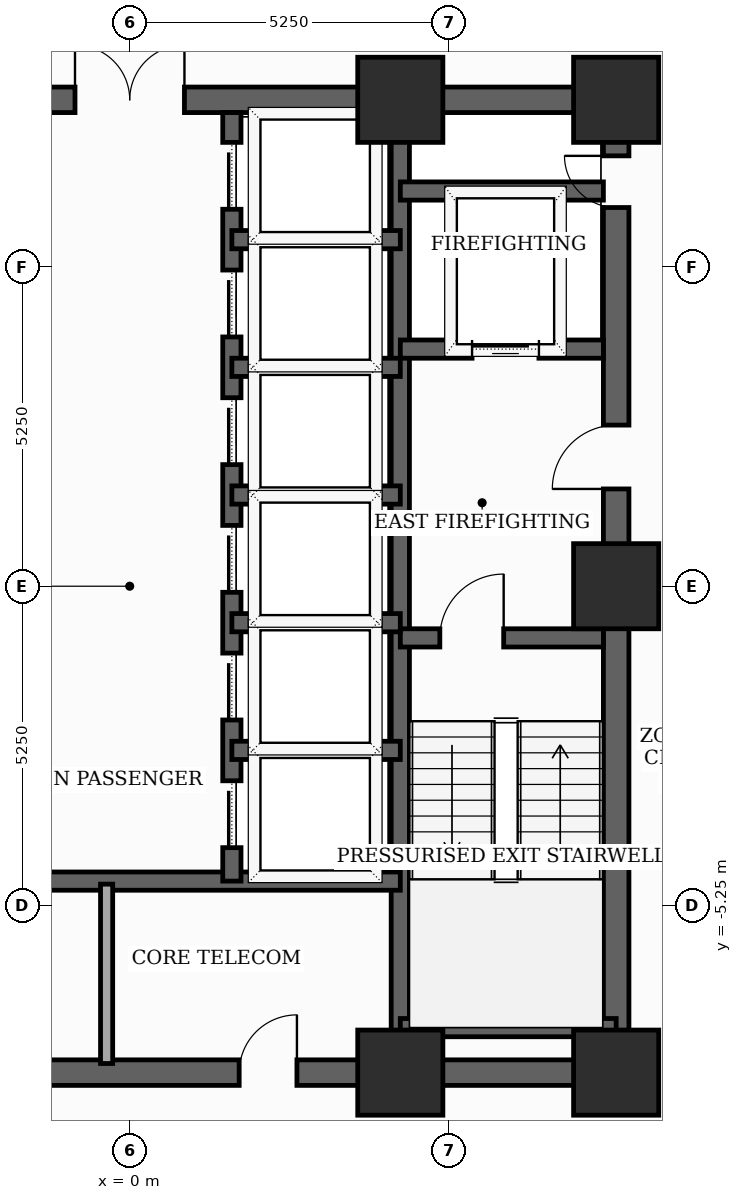
"""IFC4 building model, lengths in metres.
Left out: names, types, materials, properties, quantities, classifications, styles, units other than length and angle.
Written with IfcOpenShell. Run it as: python <this file> out.ifc"""

import sys

from ifc_helpers import new_model, si_unit, direction, frame, frame_2d, origin, origin_2d, place, context, subcontext, project, spatial, rectangle, extrude, element, fill, save


model = new_model("IFC4")
c1 = context("Model", 3, precision=1e-05, world=origin(), true_north=direction((0.0, 1.0)))
c2 = subcontext(c1, "Body", "Model", "MODEL_VIEW")
j1 = project(units=[si_unit("LENGTHUNIT", "METRE"), si_unit("PLANEANGLEUNIT", "RADIAN")], contexts=[c1])
p1 = place(None, origin())
s1 = spatial("IfcSite", under=j1, at=p1, CompositionType="ELEMENT")
p2 = place(p1, origin())
s2 = spatial("IfcBuilding", under=s1, at=p2, CompositionType="ELEMENT")
p3 = place(p2, frame((0.0, 0.0, 97.7)))
s3 = spatial("IfcBuildingStorey", under=s2, at=p3, CompositionType="ELEMENT", Elevation=97.7)
for number, where, z_axis, x_axis in (
    (1, (4.45, -8.0, 0.0), (0.0, 0.0, 1.0), (1.0, 0.0, 0.0)),
    (2, (8.0, -8.0, 0.0), (0.0, 0.0, 1.0), (1.0, 0.0, 0.0)),
    (3, (8.0, 0.0, 0.0), (0.0, 0.0, 1.0), (1.0, 0.0, 0.0)),
    (4, (8.0, 8.0, 0.0), (0.0, 0.0, 1.0), (1.0, 0.0, 0.0)),
    (5, (4.45, 8.0, 0.0), (0.0, 0.0, 1.0), (1.0, 0.0, 0.0)),
):
    element("IfcColumn", number, at=place(p3, frame(where, z_axis=z_axis, x_axis=x_axis)), inside=s3, PredefinedType="COLUMN", context=c2, shape_type="SweptSolid", body=[
        extrude(rectangle(XDim=1.4, YDim=1.4, at=origin_2d()), origin(), (0.0, 0.0, 1.0), 3.7),
    ])
p4 = place(p3, frame((8.0, -8.0, 0.0), z_axis=(0.0, 0.0, 1.0), x_axis=(0.0, 1.0, 0.0)))
e6 = element("IfcWall", 6, at=p4, inside=s3, PredefinedType="SHEAR", context=c2, shape_type="SweptSolid", body=[
    extrude(rectangle(XDim=16.0, YDim=0.42, at=frame_2d((8.0, 0.0))), origin(), (0.0, 0.0, 1.0), 3.5),
])
p5 = place(p4, frame((9.6, 0.0, 0.0)))
e7 = element("IfcOpeningElement", 7, at=p5, cuts=e6, PredefinedType="OPENING", context=c2, shape_type="SweptSolid", body=[
    extrude(rectangle(XDim=1.05, YDim=2.15, at=frame_2d((0.525, 1.075))), frame((0.0, 0.22, 0.0), z_axis=(0.0, -1.0, 0.0), x_axis=(1.0, 0.0, 0.0)), (0.0, 0.0, 1.0), 0.44),
])
p6 = place(p4, frame((14.229, 0.0, 0.0)))
e8 = element("IfcOpeningElement", 8, at=p6, cuts=e6, PredefinedType="OPENING", context=c2, shape_type="SweptSolid", body=[
    extrude(rectangle(XDim=0.85, YDim=2.02, at=frame_2d((0.425, 1.01))), frame((0.0, 0.22, 0.0), z_axis=(0.0, -1.0, 0.0), x_axis=(1.0, 0.0, 0.0)), (0.0, 0.0, 1.0), 0.44),
])
p7 = place(p3, frame((-8.0, -8.0, 0.0), z_axis=(0.0, 0.0, 1.0), x_axis=(1.0, 0.0, 0.0)))
e9 = element("IfcWall", 9, at=p7, inside=s3, PredefinedType="SHEAR", context=c2, shape_type="SweptSolid", body=[
    extrude(rectangle(XDim=16.0, YDim=0.42, at=frame_2d((8.0, 0.0))), origin(), (0.0, 0.0, 1.0), 3.5),
])
p8 = place(p7, frame((5.2, 0.0, 0.0)))
e10 = element("IfcOpeningElement", 10, at=p8, cuts=e9, PredefinedType="OPENING", context=c2, shape_type="SweptSolid", body=[
    extrude(rectangle(XDim=0.95, YDim=2.1, at=frame_2d((0.475, 1.05))), frame((0.0, 0.22, 0.0), z_axis=(0.0, -1.0, 0.0), x_axis=(1.0, 0.0, 0.0)), (0.0, 0.0, 1.0), 0.44),
])
p9 = place(p7, frame((9.8, 0.0, 0.0)))
e11 = element("IfcOpeningElement", 11, at=p9, cuts=e9, PredefinedType="OPENING", context=c2, shape_type="SweptSolid", body=[
    extrude(rectangle(XDim=0.95, YDim=2.1, at=frame_2d((0.475, 1.05))), frame((0.0, 0.22, 0.0), z_axis=(0.0, -1.0, 0.0), x_axis=(1.0, 0.0, 0.0)), (0.0, 0.0, 1.0), 0.44),
])
p10 = place(p3, frame((-8.0, 8.0, 0.0), z_axis=(0.0, 0.0, 1.0), x_axis=(1.0, 0.0, 0.0)))
e12 = element("IfcWall", 12, at=p10, inside=s3, PredefinedType="SHEAR", context=c2, shape_type="SweptSolid", body=[
    extrude(rectangle(XDim=16.0, YDim=0.42, at=frame_2d((8.0, 0.0))), origin(), (0.0, 0.0, 1.0), 3.5),
])
p11 = place(p10, frame((7.1, 0.0, 0.0)))
e13 = element("IfcOpeningElement", 13, at=p11, cuts=e12, PredefinedType="OPENING", context=c2, shape_type="SweptSolid", body=[
    extrude(rectangle(XDim=1.8, YDim=2.15, at=frame_2d((0.9, 1.075))), frame((0.0, 0.22, 0.0), z_axis=(0.0, -1.0, 0.0), x_axis=(1.0, 0.0, 0.0)), (0.0, 0.0, 1.0), 0.44),
])
p12 = place(p3, frame((4.45, -7.79, 0.0), z_axis=(0.0, 0.0, 1.0), x_axis=(0.0, 1.0, 0.0)))
e14 = element("IfcWall", 14, at=p12, inside=s3, PredefinedType="SHEAR", context=c2, shape_type="SweptSolid", body=[
    extrude(rectangle(XDim=15.58, YDim=0.3, at=frame_2d((7.79, 0.0))), origin(), (0.0, 0.0, 1.0), 3.5),
])
p13 = place(p3, frame((4.45, -0.85, 0.0), z_axis=(0.0, 0.0, 1.0), x_axis=(1.0, 0.0, 0.0)))
e15 = element("IfcWall", 15, at=p13, inside=s3, PredefinedType="SHEAR", context=c2, shape_type="SweptSolid", body=[
    extrude(rectangle(XDim=3.34, YDim=0.3, at=frame_2d((1.67, 0.0))), origin(), (0.0, 0.0, 1.0), 3.5),
])
p14 = place(p13, frame((0.65, 0.0, 0.0)))
e16 = element("IfcOpeningElement", 16, at=p14, cuts=e15, PredefinedType="OPENING", context=c2, shape_type="SweptSolid", body=[
    extrude(rectangle(XDim=1.05, YDim=2.15, at=frame_2d((0.525, 1.075))), frame((0.0, 0.16, 0.0), z_axis=(0.0, -1.0, 0.0), x_axis=(1.0, 0.0, 0.0)), (0.0, 0.0, 1.0), 0.32),
])
p15 = place(p3, frame((4.45, -7.26, 0.0), z_axis=(0.0, 0.0, 1.0), x_axis=(1.0, 0.0, 0.0)))
e17 = element("IfcWall", 17, at=p15, inside=s3, PredefinedType="SHEAR", context=c2, shape_type="SweptSolid", body=[
    extrude(rectangle(XDim=3.55, YDim=0.3, at=frame_2d((1.775, 0.0))), origin(), (0.0, 0.0, 1.0), 3.5),
])
p16 = place(p3, frame((4.45, 3.9, 0.0), z_axis=(0.0, 0.0, 1.0), x_axis=(1.0, 0.0, 0.0)))
e18 = element("IfcWall", 18, at=p16, inside=s3, PredefinedType="SHEAR", context=c2, shape_type="SweptSolid", body=[
    extrude(rectangle(XDim=3.34, YDim=0.3, at=frame_2d((1.67, 0.0))), origin(), (0.0, 0.0, 1.0), 3.5),
])
p17 = place(p16, frame((1.18, 0.0, 0.0)))
e19 = element("IfcOpeningElement", 19, at=p17, cuts=e18, PredefinedType="OPENING", context=c2, shape_type="SweptSolid", body=[
    extrude(rectangle(XDim=1.1, YDim=2.1, at=frame_2d((0.55, 1.05))), frame((0.0, 0.16, 0.0), z_axis=(0.0, -1.0, 0.0), x_axis=(1.0, 0.0, 0.0)), (0.0, 0.0, 1.0), 0.32),
])
p18 = place(p3, frame((4.45, 6.5, 0.0), z_axis=(0.0, 0.0, 1.0), x_axis=(1.0, 0.0, 0.0)))
e20 = element("IfcWall", 20, at=p18, inside=s3, PredefinedType="SHEAR", context=c2, shape_type="SweptSolid", body=[
    extrude(rectangle(XDim=3.34, YDim=0.3, at=frame_2d((1.67, 0.0))), origin(), (0.0, 0.0, 1.0), 3.5),
])
p19 = place(p3, frame((-4.45, -4.85, 0.0), z_axis=(0.0, 0.0, 1.0), x_axis=(1.0, 0.0, 0.0)))
e21 = element("IfcWall", 21, at=p19, inside=s3, PredefinedType="SHEAR", context=c2, shape_type="SweptSolid", body=[
    extrude(rectangle(XDim=8.9, YDim=0.3, at=frame_2d((4.45, 0.0))), origin(), (0.0, 0.0, 1.0), 3.5),
])
p20 = place(p3, frame((1.68, -4.85, 0.0), z_axis=(0.0, 0.0, 1.0), x_axis=(0.0, 1.0, 0.0)))
e22 = element("IfcWall", 22, at=p20, inside=s3, PredefinedType="SHEAR", context=c2, shape_type="SweptSolid", body=[
    extrude(rectangle(XDim=12.64, YDim=0.3, at=frame_2d((6.32, 0.0))), origin(), (0.0, 0.0, 1.0), 3.5),
])
p21 = place(p20, frame((0.55, 0.0, 0.0)))
e23 = element("IfcOpeningElement", 23, at=p21, cuts=e22, PredefinedType="OPENING", context=c2, shape_type="SweptSolid", body=[
    extrude(rectangle(XDim=1.1, YDim=2.1, at=frame_2d((0.55, 1.05))), frame((0.0, 0.16, 0.0), z_axis=(0.0, -1.0, 0.0), x_axis=(1.0, 0.0, 0.0)), (0.0, 0.0, 1.0), 0.32),
])
p22 = place(p20, frame((2.65, 0.0, 0.0)))
e24 = element("IfcOpeningElement", 24, at=p22, cuts=e22, PredefinedType="OPENING", context=c2, shape_type="SweptSolid", body=[
    extrude(rectangle(XDim=1.1, YDim=2.1, at=frame_2d((0.55, 1.05))), frame((0.0, 0.16, 0.0), z_axis=(0.0, -1.0, 0.0), x_axis=(1.0, 0.0, 0.0)), (0.0, 0.0, 1.0), 0.32),
])
p23 = place(p20, frame((4.75, 0.0, 0.0)))
e25 = element("IfcOpeningElement", 25, at=p23, cuts=e22, PredefinedType="OPENING", context=c2, shape_type="SweptSolid", body=[
    extrude(rectangle(XDim=1.1, YDim=2.1, at=frame_2d((0.55, 1.05))), frame((0.0, 0.16, 0.0), z_axis=(0.0, -1.0, 0.0), x_axis=(1.0, 0.0, 0.0)), (0.0, 0.0, 1.0), 0.32),
])
p24 = place(p20, frame((6.85, 0.0, 0.0)))
e26 = element("IfcOpeningElement", 26, at=p24, cuts=e22, PredefinedType="OPENING", context=c2, shape_type="SweptSolid", body=[
    extrude(rectangle(XDim=1.1, YDim=2.1, at=frame_2d((0.55, 1.05))), frame((0.0, 0.16, 0.0), z_axis=(0.0, -1.0, 0.0), x_axis=(1.0, 0.0, 0.0)), (0.0, 0.0, 1.0), 0.32),
])
p25 = place(p20, frame((8.95, 0.0, 0.0)))
e27 = element("IfcOpeningElement", 27, at=p25, cuts=e22, PredefinedType="OPENING", context=c2, shape_type="SweptSolid", body=[
    extrude(rectangle(XDim=1.1, YDim=2.1, at=frame_2d((0.55, 1.05))), frame((0.0, 0.16, 0.0), z_axis=(0.0, -1.0, 0.0), x_axis=(1.0, 0.0, 0.0)), (0.0, 0.0, 1.0), 0.32),
])
p26 = place(p20, frame((11.05, 0.0, 0.0)))
e28 = element("IfcOpeningElement", 28, at=p26, cuts=e22, PredefinedType="OPENING", context=c2, shape_type="SweptSolid", body=[
    extrude(rectangle(XDim=1.1, YDim=2.1, at=frame_2d((0.55, 1.05))), frame((0.0, 0.16, 0.0), z_axis=(0.0, -1.0, 0.0), x_axis=(1.0, 0.0, 0.0)), (0.0, 0.0, 1.0), 0.32),
])
for number, where, z_axis, x_axis in (
    (29, (1.68, 1.5, 0.0), (0.0, 0.0, 1.0), (1.0, 0.0, 0.0)),
    (30, (1.68, 3.6, 0.0), (0.0, 0.0, 1.0), (1.0, 0.0, 0.0)),
    (31, (1.68, 5.7, 0.0), (0.0, 0.0, 1.0), (1.0, 0.0, 0.0)),
    (32, (1.68, -2.7, 0.0), (0.0, 0.0, 1.0), (1.0, 0.0, 0.0)),
    (33, (1.68, -0.6, 0.0), (0.0, 0.0, 1.0), (1.0, 0.0, 0.0)),
):
    element("IfcWall", number, at=place(p3, frame(where, z_axis=z_axis, x_axis=x_axis)), inside=s3, PredefinedType="SHEAR", context=c2, shape_type="SweptSolid", body=[
        extrude(rectangle(XDim=2.77, YDim=0.3, at=frame_2d((1.385, 0.0))), origin(), (0.0, 0.0, 1.0), 3.5),
    ])
p27 = place(p3, frame((-0.38, -7.85, 0.0), z_axis=(0.0, 0.0, 1.0), x_axis=(0.0, 1.0, 0.0)))
e34 = element("IfcWall", 34, at=p27, inside=s3, PredefinedType="SOLIDWALL", context=c2, shape_type="SweptSolid", body=[
    extrude(rectangle(XDim=2.95, YDim=0.2, at=frame_2d((1.475, 0.0))), origin(), (0.0, 0.0, 1.0), 2.885),
])
p28 = place(p5, origin())
e35 = element("IfcDoor", 35, at=p28, inside=s3, OperationType="SINGLE_SWING_LEFT", PredefinedType="DOOR", context=c2, shape_type="SweptSolid", body=[
    extrude(rectangle(XDim=1.05, YDim=2.15, at=frame_2d((0.525, 1.075))), frame((0.0, 0.025, 0.0), z_axis=(0.0, -1.0, 0.0), x_axis=(1.0, 0.0, 0.0)), (0.0, 0.0, 1.0), 0.05),
])
fill(e7, e35)
p29 = place(p6, origin())
e36 = element("IfcDoor", 36, at=p29, inside=s3, OperationType="SINGLE_SWING_RIGHT", PredefinedType="TRAPDOOR", context=c2, shape_type="SweptSolid", body=[
    extrude(rectangle(XDim=0.85, YDim=2.02, at=frame_2d((0.425, 1.01))), frame((0.0, 0.025, 0.0), z_axis=(0.0, -1.0, 0.0), x_axis=(1.0, 0.0, 0.0)), (0.0, 0.0, 1.0), 0.05),
])
fill(e8, e36)
p30 = place(p9, origin())
e37 = element("IfcDoor", 37, at=p30, inside=s3, OperationType="SINGLE_SWING_RIGHT", PredefinedType="DOOR", context=c2, shape_type="SweptSolid", body=[
    extrude(rectangle(XDim=0.95, YDim=2.1, at=frame_2d((0.475, 1.05))), frame((0.0, 0.025, 0.0), z_axis=(0.0, -1.0, 0.0), x_axis=(1.0, 0.0, 0.0)), (0.0, 0.0, 1.0), 0.05),
])
fill(e11, e37)
p31 = place(p11, origin())
e38 = element("IfcDoor", 38, at=p31, inside=s3, OperationType="DOUBLE_DOOR_SINGLE_SWING", PredefinedType="DOOR", context=c2, shape_type="SweptSolid", body=[
    extrude(rectangle(XDim=1.8, YDim=2.15, at=frame_2d((0.9, 1.075))), frame((0.0, 0.025, 0.0), z_axis=(0.0, -1.0, 0.0), x_axis=(1.0, 0.0, 0.0)), (0.0, 0.0, 1.0), 0.05),
])
fill(e13, e38)
p32 = place(p14, origin())
e39 = element("IfcDoor", 39, at=p32, inside=s3, OperationType="SINGLE_SWING_RIGHT", PredefinedType="DOOR", context=c2, shape_type="SweptSolid", body=[
    extrude(rectangle(XDim=1.05, YDim=2.15, at=frame_2d((0.525, 1.075))), frame((0.0, 0.025, 0.0), z_axis=(0.0, -1.0, 0.0), x_axis=(1.0, 0.0, 0.0)), (0.0, 0.0, 1.0), 0.05),
])
fill(e16, e39)
p33 = place(p17, origin())
e40 = element("IfcDoor", 40, at=p33, inside=s3, OperationType="SLIDING_TO_LEFT", PredefinedType="DOOR", context=c2, shape_type="SweptSolid", body=[
    extrude(rectangle(XDim=1.1, YDim=2.1, at=frame_2d((0.55, 1.05))), frame((0.0, 0.025, 0.0), z_axis=(0.0, -1.0, 0.0), x_axis=(1.0, 0.0, 0.0)), (0.0, 0.0, 1.0), 0.05),
])
fill(e19, e40)
p34 = place(p21, origin())
e41 = element("IfcDoor", 41, at=p34, inside=s3, OperationType="SLIDING_TO_LEFT", PredefinedType="DOOR", context=c2, shape_type="SweptSolid", body=[
    extrude(rectangle(XDim=1.1, YDim=2.1, at=frame_2d((0.55, 1.05))), frame((0.0, 0.025, 0.0), z_axis=(0.0, -1.0, 0.0), x_axis=(1.0, 0.0, 0.0)), (0.0, 0.0, 1.0), 0.05),
])
fill(e23, e41)
p35 = place(p22, origin())
e42 = element("IfcDoor", 42, at=p35, inside=s3, OperationType="SLIDING_TO_LEFT", PredefinedType="DOOR", context=c2, shape_type="SweptSolid", body=[
    extrude(rectangle(XDim=1.1, YDim=2.1, at=frame_2d((0.55, 1.05))), frame((0.0, 0.025, 0.0), z_axis=(0.0, -1.0, 0.0), x_axis=(1.0, 0.0, 0.0)), (0.0, 0.0, 1.0), 0.05),
])
fill(e24, e42)
p36 = place(p23, origin())
e43 = element("IfcDoor", 43, at=p36, inside=s3, OperationType="SLIDING_TO_LEFT", PredefinedType="DOOR", context=c2, shape_type="SweptSolid", body=[
    extrude(rectangle(XDim=1.1, YDim=2.1, at=frame_2d((0.55, 1.05))), frame((0.0, 0.025, 0.0), z_axis=(0.0, -1.0, 0.0), x_axis=(1.0, 0.0, 0.0)), (0.0, 0.0, 1.0), 0.05),
])
fill(e25, e43)
p37 = place(p24, origin())
e44 = element("IfcDoor", 44, at=p37, inside=s3, OperationType="SLIDING_TO_LEFT", PredefinedType="DOOR", context=c2, shape_type="SweptSolid", body=[
    extrude(rectangle(XDim=1.1, YDim=2.1, at=frame_2d((0.55, 1.05))), frame((0.0, 0.025, 0.0), z_axis=(0.0, -1.0, 0.0), x_axis=(1.0, 0.0, 0.0)), (0.0, 0.0, 1.0), 0.05),
])
fill(e26, e44)
p38 = place(p25, origin())
e45 = element("IfcDoor", 45, at=p38, inside=s3, OperationType="SLIDING_TO_LEFT", PredefinedType="DOOR", context=c2, shape_type="SweptSolid", body=[
    extrude(rectangle(XDim=1.1, YDim=2.1, at=frame_2d((0.55, 1.05))), frame((0.0, 0.025, 0.0), z_axis=(0.0, -1.0, 0.0), x_axis=(1.0, 0.0, 0.0)), (0.0, 0.0, 1.0), 0.05),
])
fill(e27, e45)
p39 = place(p26, origin())
e46 = element("IfcDoor", 46, at=p39, inside=s3, OperationType="SLIDING_TO_LEFT", PredefinedType="DOOR", context=c2, shape_type="SweptSolid", body=[
    extrude(rectangle(XDim=1.1, YDim=2.1, at=frame_2d((0.55, 1.05))), frame((0.0, 0.025, 0.0), z_axis=(0.0, -1.0, 0.0), x_axis=(1.0, 0.0, 0.0)), (0.0, 0.0, 1.0), 0.05),
])
fill(e28, e46)
save(model, sys.argv[1])
